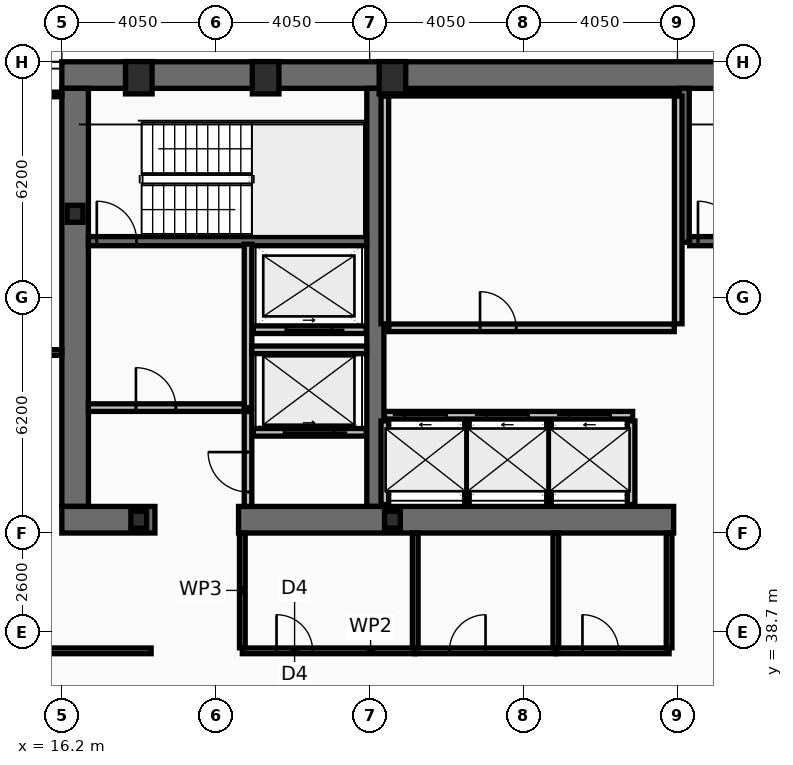
"""IFC4 building model, lengths in metres.
Left out: names, types, materials, properties, quantities, classifications, styles, units other than length and angle.
Written with IfcOpenShell. Run it as: python <this file> out.ifc"""

import sys

from ifc_helpers import new_model, si_unit, direction, frame, frame_2d, origin, origin_2d, place, context, subcontext, project, spatial, rectangle, hollow_rectangle, i_section, extrude, element, fill, save


model = new_model("IFC4")
c1 = context("Model", 3, precision=1e-05, world=origin(), true_north=direction((0.0, 1.0)))
c2 = subcontext(c1, "Body", "Model", "MODEL_VIEW")
j1 = project(units=[si_unit("LENGTHUNIT", "METRE"), si_unit("PLANEANGLEUNIT", "RADIAN")], contexts=[c1])
p1 = place(None, origin())
s1 = spatial("IfcSite", under=j1, at=p1, CompositionType="ELEMENT")
p2 = place(p1, origin())
s2 = spatial("IfcBuilding", under=s1, at=p2, CompositionType="ELEMENT")
p3 = place(p2, frame((0.0, 0.0, 121.8)))
s3 = spatial("IfcBuildingStorey", under=s2, at=p3, CompositionType="ELEMENT", Elevation=121.8)
p4 = place(p3, frame((16.2, 53.35, 0.0), z_axis=(0.0, 0.0, 1.0), x_axis=(1.0, 0.0, 0.0)))
e1 = element("IfcWall", 1, at=p4, inside=s3, PredefinedType="SHEAR", context=c2, shape_type="SweptSolid", body=[
    extrude(rectangle(XDim=40.5, YDim=0.7, at=frame_2d((20.25, 0.0))), origin(), (0.0, 0.0, 1.0), 3.44),
])
p5 = place(p3, frame((16.55, 42.0, 0.0), z_axis=(0.0, 0.0, 1.0), x_axis=(0.0, 1.0, 0.0)))
e2 = element("IfcWall", 2, at=p5, inside=s3, PredefinedType="SHEAR", context=c2, shape_type="SweptSolid", body=[
    extrude(rectangle(XDim=11.0, YDim=0.7, at=frame_2d((5.5, 0.0))), origin(), (0.0, 0.0, 1.0), 3.44),
])
p6 = place(p3, frame((24.45, 42.0, 0.0), z_axis=(0.0, 0.0, 1.0), x_axis=(0.0, 1.0, 0.0)))
e3 = element("IfcWall", 3, at=p6, inside=s3, PredefinedType="SHEAR", context=c2, shape_type="SweptSolid", body=[
    extrude(rectangle(XDim=11.0, YDim=0.45, at=frame_2d((5.5, 0.0))), origin(), (0.0, 0.0, 1.0), 3.44),
])
p7 = place(p3, frame((18.65, 41.65, 0.0), z_axis=(0.0, 0.0, 1.0), x_axis=(-1.0, 0.0, 0.0)))
e4 = element("IfcWall", 4, at=p7, inside=s3, PredefinedType="SHEAR", context=c2, shape_type="SweptSolid", body=[
    extrude(rectangle(XDim=2.45, YDim=0.7, at=frame_2d((1.225, 0.0))), origin(), (0.0, 0.0, 1.0), 3.44),
])
p8 = place(p3, frame((32.3, 41.65, 0.0), z_axis=(0.0, 0.0, 1.0), x_axis=(-1.0, 0.0, 0.0)))
e5 = element("IfcWall", 5, at=p8, inside=s3, PredefinedType="SHEAR", context=c2, shape_type="SweptSolid", body=[
    extrude(rectangle(XDim=11.45, YDim=0.7, at=frame_2d((5.725, 0.0))), origin(), (0.0, 0.0, 1.0), 3.44),
])
p9 = place(p3, frame((32.58, 48.95, 0.0), z_axis=(0.0, 0.0, 1.0), x_axis=(0.0, 1.0, 0.0)))
e6 = element("IfcWall", 6, at=p9, inside=s3, PredefinedType="SHEAR", context=c2, shape_type="SweptSolid", body=[
    extrude(rectangle(XDim=4.05, YDim=0.26, at=frame_2d((2.025, 0.0))), origin(), (0.0, 0.0, 1.0), 3.44),
])
p10 = place(p3, frame((16.9, 48.98, 0.0), z_axis=(0.0, 0.0, 1.0), x_axis=(1.0, 0.0, 0.0)))
e7 = element("IfcWall", 7, at=p10, inside=s3, PredefinedType="SHEAR", context=c2, shape_type="SweptSolid", body=[
    extrude(rectangle(XDim=7.32, YDim=0.24, at=frame_2d((3.66, 0.0))), origin(), (0.0, 0.0, 1.0), 3.44),
])
p11 = place(p10, frame((0.22, 0.0, 0.0)))
e8 = element("IfcOpeningElement", 8, at=p11, cuts=e7, PredefinedType="OPENING", context=c2, shape_type="SweptSolid", body=[
    extrude(rectangle(XDim=1.05, YDim=2.15, at=frame_2d((0.525, 1.075))), frame((0.0, 0.13, 0.0), z_axis=(0.0, -1.0, 0.0), x_axis=(1.0, 0.0, 0.0)), (0.0, 0.0, 1.0), 0.26),
])
p12 = place(p3, frame((32.72, 48.98, 0.0), z_axis=(0.0, 0.0, 1.0), x_axis=(1.0, 0.0, 0.0)))
e9 = element("IfcWall", 9, at=p12, inside=s3, PredefinedType="SHEAR", context=c2, shape_type="SweptSolid", body=[
    extrude(rectangle(XDim=7.56, YDim=0.24, at=frame_2d((3.78, 0.0))), origin(), (0.0, 0.0, 1.0), 3.44),
])
p13 = place(p12, frame((0.22, 0.0, 0.0)))
e10 = element("IfcOpeningElement", 10, at=p13, cuts=e9, PredefinedType="OPENING", context=c2, shape_type="SweptSolid", body=[
    extrude(rectangle(XDim=1.05, YDim=2.15, at=frame_2d((0.525, 1.075))), frame((0.0, 0.13, 0.0), z_axis=(0.0, -1.0, 0.0), x_axis=(1.0, 0.0, 0.0)), (0.0, 0.0, 1.0), 0.26),
])
for number, where, z_axis, x_axis in (
    (11, (18.225, 53.28, 0.0), (0.0, 0.0, 1.0), (1.0, 0.0, 0.0)),
    (12, (21.562, 53.28, 0.0), (0.0, 0.0, 1.0), (1.0, 0.0, 0.0)),
    (13, (24.9, 53.28, 0.0), (0.0, 0.0, 1.0), (1.0, 0.0, 0.0)),
):
    element("IfcColumn", number, at=place(p3, frame(where, z_axis=z_axis, x_axis=x_axis)), inside=s3, PredefinedType="COLUMN", context=c2, shape_type="SweptSolid", body=[
        extrude(hollow_rectangle(XDim=0.7, YDim=0.85, WallThickness=0.05, at=origin_2d()), origin(), (0.0, 0.0, 1.0), 3.6),
    ])
for number, where, z_axis, x_axis in (
    (14, (16.55, 49.7, 0.0), (0.0, 0.0, 1.0), (1.0, 0.0, 0.0)),
    (15, (18.225, 41.65, 0.0), (0.0, 0.0, 1.0), (1.0, 0.0, 0.0)),
    (16, (24.9, 41.65, 0.0), (0.0, 0.0, 1.0), (1.0, 0.0, 0.0)),
):
    element("IfcColumn", number, at=place(p3, frame(where, z_axis=z_axis, x_axis=x_axis)), inside=s3, PredefinedType="COLUMN", context=c2, shape_type="SweptSolid", body=[
        extrude(i_section(OverallWidth=0.416, OverallDepth=0.446, WebThickness=0.039, FlangeThickness=0.063, at=origin_2d()), origin(), (0.0, 0.0, 1.0), 3.6),
    ])
p14 = place(p3, frame((24.69, 44.4, 0.0), z_axis=(0.0, 0.0, 1.0), x_axis=(1.0, 0.0, 0.0)))
e17 = element("IfcWall", 17, at=p14, inside=s3, PredefinedType="PARTITIONING", context=c2, shape_type="SweptSolid", body=[
    extrude(rectangle(XDim=6.53, YDim=0.2, at=frame_2d((3.265, 0.0))), origin(), (0.0, 0.0, 1.0), 3.44),
])
p15 = place(p14, frame((0.53, 0.0, 0.0)))
e18 = element("IfcOpeningElement", 18, at=p15, cuts=e17, PredefinedType="OPENING", context=c2, shape_type="SweptSolid", body=[
    extrude(rectangle(XDim=1.1, YDim=2.18, at=frame_2d((0.55, 1.09))), frame((0.0, 0.11, 0.0), z_axis=(0.0, -1.0, 0.0), x_axis=(1.0, 0.0, 0.0)), (0.0, 0.0, 1.0), 0.22),
])
p16 = place(p14, frame((2.69, 0.0, 0.0)))
e19 = element("IfcOpeningElement", 19, at=p16, cuts=e17, PredefinedType="OPENING", context=c2, shape_type="SweptSolid", body=[
    extrude(rectangle(XDim=1.1, YDim=2.18, at=frame_2d((0.55, 1.09))), frame((0.0, 0.11, 0.0), z_axis=(0.0, -1.0, 0.0), x_axis=(1.0, 0.0, 0.0)), (0.0, 0.0, 1.0), 0.22),
])
p17 = place(p14, frame((4.85, 0.0, 0.0)))
e20 = element("IfcOpeningElement", 20, at=p17, cuts=e17, PredefinedType="OPENING", context=c2, shape_type="SweptSolid", body=[
    extrude(rectangle(XDim=1.1, YDim=2.18, at=frame_2d((0.55, 1.09))), frame((0.0, 0.11, 0.0), z_axis=(0.0, -1.0, 0.0), x_axis=(1.0, 0.0, 0.0)), (0.0, 0.0, 1.0), 0.22),
])
p18 = place(p3, frame((24.21, 43.95, 0.0), z_axis=(0.0, 0.0, 1.0), x_axis=(-1.0, 0.0, 0.0)))
e21 = element("IfcWall", 21, at=p18, inside=s3, PredefinedType="PARTITIONING", context=c2, shape_type="SweptSolid", body=[
    extrude(rectangle(XDim=2.97, YDim=0.2, at=frame_2d((1.485, 0.0))), origin(), (0.0, 0.0, 1.0), 3.44),
])
p19 = place(p18, frame((0.86, 0.0, 0.0)))
e22 = element("IfcOpeningElement", 22, at=p19, cuts=e21, PredefinedType="OPENING", context=c2, shape_type="SweptSolid", body=[
    extrude(rectangle(XDim=1.3, YDim=2.18, at=frame_2d((0.65, 1.09))), frame((0.0, 0.11, 0.0), z_axis=(0.0, -1.0, 0.0), x_axis=(1.0, 0.0, 0.0)), (0.0, 0.0, 1.0), 0.22),
])
p20 = place(p3, frame((24.21, 46.65, 0.0), z_axis=(0.0, 0.0, 1.0), x_axis=(-1.0, 0.0, 0.0)))
e23 = element("IfcWall", 23, at=p20, inside=s3, PredefinedType="PARTITIONING", context=c2, shape_type="SweptSolid", body=[
    extrude(rectangle(XDim=2.97, YDim=0.2, at=frame_2d((1.485, 0.0))), origin(), (0.0, 0.0, 1.0), 3.44),
])
p21 = place(p20, frame((0.91, 0.0, 0.0)))
e24 = element("IfcOpeningElement", 24, at=p21, cuts=e23, PredefinedType="OPENING", context=c2, shape_type="SweptSolid", body=[
    extrude(rectangle(XDim=1.2, YDim=2.18, at=frame_2d((0.6, 1.09))), frame((0.0, 0.11, 0.0), z_axis=(0.0, -1.0, 0.0), x_axis=(1.0, 0.0, 0.0)), (0.0, 0.0, 1.0), 0.22),
])
p22 = place(p3, frame((21.1, 44.6, 0.0), z_axis=(0.0, 0.0, 1.0), x_axis=(0.0, 1.0, 0.0)))
e25 = element("IfcWall", 25, at=p22, inside=s3, PredefinedType="PARTITIONING", context=c2, shape_type="SweptSolid", body=[
    extrude(rectangle(XDim=4.3, YDim=0.2, at=frame_2d((2.15, 0.0))), origin(), (0.0, 0.0, 1.0), 3.44),
])
p23 = place(p3, frame((16.9, 44.6, 0.0), z_axis=(0.0, 0.0, 1.0), x_axis=(1.0, 0.0, 0.0)))
e26 = element("IfcWall", 26, at=p23, inside=s3, PredefinedType="PARTITIONING", context=c2, shape_type="SweptSolid", body=[
    extrude(rectangle(XDim=4.1, YDim=0.2, at=frame_2d((2.05, 0.0))), origin(), (0.0, 0.0, 1.0), 3.44),
])
p24 = place(p23, frame((1.25, 0.0, 0.0)))
e27 = element("IfcOpeningElement", 27, at=p24, cuts=e26, PredefinedType="OPENING", context=c2, shape_type="SweptSolid", body=[
    extrude(rectangle(XDim=1.05, YDim=2.15, at=frame_2d((0.525, 1.075))), frame((0.0, 0.11, 0.0), z_axis=(0.0, -1.0, 0.0), x_axis=(1.0, 0.0, 0.0)), (0.0, 0.0, 1.0), 0.22),
])
p25 = place(p3, frame((21.2, 46.12, 0.0), z_axis=(0.0, 0.0, 1.0), x_axis=(1.0, 0.0, 0.0)))
e28 = element("IfcWall", 28, at=p25, inside=s3, PredefinedType="PARTITIONING", context=c2, shape_type="SweptSolid", body=[
    extrude(rectangle(XDim=3.02, YDim=0.2, at=frame_2d((1.51, 0.0))), origin(), (0.0, 0.0, 1.0), 3.44),
])
p26 = place(p3, frame((21.1, 42.0, 0.0), z_axis=(0.0, 0.0, 1.0), x_axis=(0.0, 1.0, 0.0)))
e29 = element("IfcWall", 29, at=p26, inside=s3, PredefinedType="PARTITIONING", context=c2, shape_type="SweptSolid", body=[
    extrude(rectangle(XDim=2.495, YDim=0.2, at=frame_2d((1.248, 0.0))), origin(), (0.0, 0.0, 1.0), 3.44),
])
p27 = place(p26, frame((0.38, 0.0, 0.0)))
e30 = element("IfcOpeningElement", 30, at=p27, cuts=e29, PredefinedType="OPENING", context=c2, shape_type="SweptSolid", body=[
    extrude(rectangle(XDim=1.05, YDim=2.15, at=frame_2d((0.525, 1.075))), frame((0.0, 0.11, 0.0), z_axis=(0.0, -1.0, 0.0), x_axis=(1.0, 0.0, 0.0)), (0.0, 0.0, 1.0), 0.22),
])
for number, where, z_axis, x_axis in (
    (31, (24.7, 46.805, 0.0), (0.0, 0.0, 1.0), (0.0, 1.0, 0.0)),
    (32, (32.42, 46.805, 0.0), (0.0, 0.0, 1.0), (0.0, 1.0, 0.0)),
):
    element("IfcWall", number, at=place(p3, frame(where, z_axis=z_axis, x_axis=x_axis)), inside=s3, PredefinedType="PARTITIONING", context=c2, shape_type="SweptSolid", body=[
        extrude(rectangle(XDim=5.99, YDim=0.2, at=frame_2d((2.995, 0.0))), origin(), (0.0, 0.0, 1.0), 3.44),
    ])
p28 = place(p3, frame((24.805, 52.86, 0.0), z_axis=(0.0, 0.0, 1.0), x_axis=(1.0, 0.0, 0.0)))
e33 = element("IfcWall", 33, at=p28, inside=s3, PredefinedType="PARTITIONING", context=c2, shape_type="SweptSolid", body=[
    extrude(rectangle(XDim=7.51, YDim=0.12, at=frame_2d((3.755, 0.0))), origin(), (0.0, 0.0, 1.0), 3.44),
])
p29 = place(p3, frame((24.805, 46.7, 0.0), z_axis=(0.0, 0.0, 1.0), x_axis=(1.0, 0.0, 0.0)))
e34 = element("IfcWall", 34, at=p29, inside=s3, PredefinedType="PARTITIONING", context=c2, shape_type="SweptSolid", body=[
    extrude(rectangle(XDim=7.51, YDim=0.2, at=frame_2d((3.755, 0.0))), origin(), (0.0, 0.0, 1.0), 3.44),
])
p30 = place(p29, frame((2.4, 0.0, 0.0)))
e35 = element("IfcOpeningElement", 35, at=p30, cuts=e34, PredefinedType="OPENING", context=c2, shape_type="SweptSolid", body=[
    extrude(rectangle(XDim=0.95, YDim=2.1, at=frame_2d((0.475, 1.05))), frame((0.0, 0.11, 0.0), z_axis=(0.0, -1.0, 0.0), x_axis=(1.0, 0.0, 0.0)), (0.0, 0.0, 1.0), 0.22),
])
for number, where, z_axis, x_axis in (
    (36, (24.7, 42.05, 0.0), (0.0, 0.0, 1.0), (0.0, 1.0, 0.0)),
    (37, (31.18, 42.05, 0.0), (0.0, 0.0, 1.0), (0.0, 1.0, 0.0)),
):
    element("IfcWall", number, at=place(p3, frame(where, z_axis=z_axis, x_axis=x_axis)), inside=s3, PredefinedType="PARTITIONING", context=c2, shape_type="SweptSolid", body=[
        extrude(rectangle(XDim=2.2, YDim=0.2, at=frame_2d((1.1, 0.0))), origin(), (0.0, 0.0, 1.0), 3.44),
    ])
for number, where, z_axis, x_axis in (
    (38, (26.86, 42.05, 0.0), (0.0, 0.0, 1.0), (0.0, 1.0, 0.0)),
    (39, (29.02, 42.05, 0.0), (0.0, 0.0, 1.0), (0.0, 1.0, 0.0)),
):
    element("IfcWall", number, at=place(p3, frame(where, z_axis=z_axis, x_axis=x_axis)), inside=s3, PredefinedType="PARTITIONING", context=c2, shape_type="SweptSolid", body=[
        extrude(rectangle(XDim=2.2, YDim=0.12, at=frame_2d((1.1, 0.0))), origin(), (0.0, 0.0, 1.0), 3.44),
    ])
p31 = place(p3, frame((20.95, 38.2, 0.0), z_axis=(0.0, 0.0, 1.0), x_axis=(1.0, 0.0, 0.0)))
e40 = element("IfcWall", 40, at=p31, inside=s3, PredefinedType="PARTITIONING", context=c2, shape_type="SweptSolid", body=[
    extrude(rectangle(XDim=4.55, YDim=0.15, at=frame_2d((2.275, 0.0))), origin(), (0.0, 0.0, 1.0), 2.73),
])
p32 = place(p31, frame((0.9, 0.0, 0.0)))
e41 = element("IfcOpeningElement", 41, at=p32, cuts=e40, PredefinedType="OPENING", context=c2, shape_type="SweptSolid", body=[
    extrude(rectangle(XDim=0.95, YDim=2.05, at=frame_2d((0.475, 1.025))), frame((0.0, 0.085, 0.0), z_axis=(0.0, -1.0, 0.0), x_axis=(1.0, 0.0, 0.0)), (0.0, 0.0, 1.0), 0.17),
])
p33 = place(p3, frame((25.5, 38.2, 0.0), z_axis=(0.0, 0.0, 1.0), x_axis=(1.0, 0.0, 0.0)))
e42 = element("IfcWall", 42, at=p33, inside=s3, PredefinedType="PARTITIONING", context=c2, shape_type="SweptSolid", body=[
    extrude(rectangle(XDim=3.7, YDim=0.15, at=frame_2d((1.85, 0.0))), origin(), (0.0, 0.0, 1.0), 3.44),
])
p34 = place(p33, frame((0.9, 0.0, 0.0)))
e43 = element("IfcOpeningElement", 43, at=p34, cuts=e42, PredefinedType="OPENING", context=c2, shape_type="SweptSolid", body=[
    extrude(rectangle(XDim=0.95, YDim=2.05, at=frame_2d((0.475, 1.025))), frame((0.0, 0.085, 0.0), z_axis=(0.0, -1.0, 0.0), x_axis=(1.0, 0.0, 0.0)), (0.0, 0.0, 1.0), 0.17),
])
p35 = place(p3, frame((29.2, 38.2, 0.0), z_axis=(0.0, 0.0, 1.0), x_axis=(1.0, 0.0, 0.0)))
e44 = element("IfcWall", 44, at=p35, inside=s3, PredefinedType="PARTITIONING", context=c2, shape_type="SweptSolid", body=[
    extrude(rectangle(XDim=2.98, YDim=0.15, at=frame_2d((1.49, 0.0))), origin(), (0.0, 0.0, 1.0), 2.73),
])
p36 = place(p35, frame((0.7, 0.0, 0.0)))
e45 = element("IfcOpeningElement", 45, at=p36, cuts=e44, PredefinedType="OPENING", context=c2, shape_type="SweptSolid", body=[
    extrude(rectangle(XDim=0.95, YDim=2.05, at=frame_2d((0.475, 1.025))), frame((0.0, 0.085, 0.0), z_axis=(0.0, -1.0, 0.0), x_axis=(1.0, 0.0, 0.0)), (0.0, 0.0, 1.0), 0.17),
])
for number, where, z_axis, x_axis in (
    (46, (20.95, 38.28, 0.0), (0.0, 0.0, 1.0), (0.0, 1.0, 0.0)),
    (47, (25.5, 38.28, 0.0), (0.0, 0.0, 1.0), (0.0, 1.0, 0.0)),
    (48, (29.2, 38.28, 0.0), (0.0, 0.0, 1.0), (0.0, 1.0, 0.0)),
    (49, (32.18, 38.28, 0.0), (0.0, 0.0, 1.0), (0.0, 1.0, 0.0)),
):
    element("IfcWall", number, at=place(p3, frame(where, z_axis=z_axis, x_axis=x_axis)), inside=s3, PredefinedType="PARTITIONING", context=c2, shape_type="SweptSolid", body=[
        extrude(rectangle(XDim=3.02, YDim=0.15, at=frame_2d((1.51, 0.0))), origin(), (0.0, 0.0, 1.0), 3.44),
    ])
p37 = place(p3, frame((4.03, 38.2, 0.0), z_axis=(0.0, 0.0, 1.0), x_axis=(1.0, 0.0, 0.0)))
e50 = element("IfcWall", 50, at=p37, inside=s3, PredefinedType="PARTITIONING", context=c2, shape_type="SweptSolid", body=[
    extrude(rectangle(XDim=14.52, YDim=0.15, at=frame_2d((7.26, 0.0))), origin(), (0.0, 0.0, 1.0), 2.73),
])
p38 = place(p37, frame((10.32, 0.0, 0.0)))
e51 = element("IfcOpeningElement", 51, at=p38, cuts=e50, PredefinedType="OPENING", context=c2, shape_type="SweptSolid", body=[
    extrude(rectangle(XDim=0.95, YDim=2.05, at=frame_2d((0.475, 1.025))), frame((0.0, 0.085, 0.0), z_axis=(0.0, -1.0, 0.0), x_axis=(1.0, 0.0, 0.0)), (0.0, 0.0, 1.0), 0.17),
])
p39 = place(p3, frame((4.095, 46.05, 0.0), z_axis=(0.0, 0.0, 1.0), x_axis=(1.0, 0.0, 0.0)))
e52 = element("IfcWall", 52, at=p39, inside=s3, PredefinedType="PARTITIONING", context=c2, shape_type="SweptSolid", body=[
    extrude(rectangle(XDim=12.105, YDim=0.15, at=frame_2d((6.052, 0.0))), origin(), (0.0, 0.0, 1.0), 2.83),
])
p40 = place(p39, frame((10.32, 0.0, 0.0)))
e53 = element("IfcOpeningElement", 53, at=p40, cuts=e52, PredefinedType="OPENING", context=c2, shape_type="SweptSolid", body=[
    extrude(rectangle(XDim=0.9, YDim=2.05, at=frame_2d((0.45, 1.025))), frame((0.0, 0.085, 0.0), z_axis=(0.0, -1.0, 0.0), x_axis=(1.0, 0.0, 0.0)), (0.0, 0.0, 1.0), 0.17),
])
p41 = place(p3, frame((4.095, 52.84, 0.0), z_axis=(0.0, 0.0, 1.0), x_axis=(1.0, 0.0, 0.0)))
e54 = element("IfcWall", 54, at=p41, inside=s3, PredefinedType="PARTITIONING", context=c2, shape_type="SweptSolid", body=[
    extrude(rectangle(XDim=12.105, YDim=0.12, at=frame_2d((6.052, 0.0))), origin(), (0.0, 0.0, 1.0), 3.44),
])
p42 = place(p11, origin())
e55 = element("IfcDoor", 55, at=p42, inside=s3, OperationType="SINGLE_SWING_LEFT", PredefinedType="DOOR", context=c2, shape_type="SweptSolid", body=[
    extrude(rectangle(XDim=1.05, YDim=2.15, at=frame_2d((0.525, 1.075))), frame((0.0, 0.025, 0.0), z_axis=(0.0, -1.0, 0.0), x_axis=(1.0, 0.0, 0.0)), (0.0, 0.0, 1.0), 0.05),
])
fill(e8, e55)
p43 = place(p13, origin())
e56 = element("IfcDoor", 56, at=p43, inside=s3, OperationType="SINGLE_SWING_LEFT", PredefinedType="DOOR", context=c2, shape_type="SweptSolid", body=[
    extrude(rectangle(XDim=1.05, YDim=2.15, at=frame_2d((0.525, 1.075))), frame((0.0, 0.025, 0.0), z_axis=(0.0, -1.0, 0.0), x_axis=(1.0, 0.0, 0.0)), (0.0, 0.0, 1.0), 0.05),
])
fill(e10, e56)
p44 = place(p15, origin())
e57 = element("IfcDoor", 57, at=p44, inside=s3, OperationType="SLIDING_TO_LEFT", PredefinedType="DOOR", context=c2, shape_type="SweptSolid", body=[
    extrude(rectangle(XDim=1.1, YDim=2.18, at=frame_2d((0.55, 1.09))), frame((0.0, 0.025, 0.0), z_axis=(0.0, -1.0, 0.0), x_axis=(1.0, 0.0, 0.0)), (0.0, 0.0, 1.0), 0.05),
])
fill(e18, e57)
p45 = place(p16, origin())
e58 = element("IfcDoor", 58, at=p45, inside=s3, OperationType="SLIDING_TO_LEFT", PredefinedType="DOOR", context=c2, shape_type="SweptSolid", body=[
    extrude(rectangle(XDim=1.1, YDim=2.18, at=frame_2d((0.55, 1.09))), frame((0.0, 0.025, 0.0), z_axis=(0.0, -1.0, 0.0), x_axis=(1.0, 0.0, 0.0)), (0.0, 0.0, 1.0), 0.05),
])
fill(e19, e58)
p46 = place(p17, origin())
e59 = element("IfcDoor", 59, at=p46, inside=s3, OperationType="SLIDING_TO_LEFT", PredefinedType="DOOR", context=c2, shape_type="SweptSolid", body=[
    extrude(rectangle(XDim=1.1, YDim=2.18, at=frame_2d((0.55, 1.09))), frame((0.0, 0.025, 0.0), z_axis=(0.0, -1.0, 0.0), x_axis=(1.0, 0.0, 0.0)), (0.0, 0.0, 1.0), 0.05),
])
fill(e20, e59)
p47 = place(p19, origin())
e60 = element("IfcDoor", 60, at=p47, inside=s3, OperationType="SLIDING_TO_LEFT", PredefinedType="DOOR", context=c2, shape_type="SweptSolid", body=[
    extrude(rectangle(XDim=1.3, YDim=2.18, at=frame_2d((0.65, 1.09))), frame((0.0, 0.025, 0.0), z_axis=(0.0, -1.0, 0.0), x_axis=(1.0, 0.0, 0.0)), (0.0, 0.0, 1.0), 0.05),
])
fill(e22, e60)
p48 = place(p21, origin())
e61 = element("IfcDoor", 61, at=p48, inside=s3, OperationType="SLIDING_TO_LEFT", PredefinedType="DOOR", context=c2, shape_type="SweptSolid", body=[
    extrude(rectangle(XDim=1.2, YDim=2.18, at=frame_2d((0.6, 1.09))), frame((0.0, 0.025, 0.0), z_axis=(0.0, -1.0, 0.0), x_axis=(1.0, 0.0, 0.0)), (0.0, 0.0, 1.0), 0.05),
])
fill(e24, e61)
p49 = place(p24, origin())
e62 = element("IfcDoor", 62, at=p49, inside=s3, OperationType="SINGLE_SWING_LEFT", PredefinedType="DOOR", context=c2, shape_type="SweptSolid", body=[
    extrude(rectangle(XDim=1.05, YDim=2.15, at=frame_2d((0.525, 1.075))), frame((0.0, 0.025, 0.0), z_axis=(0.0, -1.0, 0.0), x_axis=(1.0, 0.0, 0.0)), (0.0, 0.0, 1.0), 0.05),
])
fill(e27, e62)
p50 = place(p27, origin())
e63 = element("IfcDoor", 63, at=p50, inside=s3, OperationType="SINGLE_SWING_RIGHT", PredefinedType="DOOR", context=c2, shape_type="SweptSolid", body=[
    extrude(rectangle(XDim=1.05, YDim=2.15, at=frame_2d((0.525, 1.075))), frame((0.0, 0.025, 0.0), z_axis=(0.0, -1.0, 0.0), x_axis=(1.0, 0.0, 0.0)), (0.0, 0.0, 1.0), 0.05),
])
fill(e30, e63)
p51 = place(p30, origin())
e64 = element("IfcDoor", 64, at=p51, inside=s3, OperationType="SINGLE_SWING_LEFT", PredefinedType="DOOR", context=c2, shape_type="SweptSolid", body=[
    extrude(rectangle(XDim=0.95, YDim=2.1, at=frame_2d((0.475, 1.05))), frame((0.0, 0.025, 0.0), z_axis=(0.0, -1.0, 0.0), x_axis=(1.0, 0.0, 0.0)), (0.0, 0.0, 1.0), 0.05),
])
fill(e35, e64)
p52 = place(p32, origin())
e65 = element("IfcDoor", 65, at=p52, inside=s3, OperationType="SINGLE_SWING_LEFT", PredefinedType="DOOR", context=c2, shape_type="SweptSolid", body=[
    extrude(rectangle(XDim=0.95, YDim=2.05, at=frame_2d((0.475, 1.025))), frame((0.0, 0.025, 0.0), z_axis=(0.0, -1.0, 0.0), x_axis=(1.0, 0.0, 0.0)), (0.0, 0.0, 1.0), 0.05),
])
fill(e41, e65)
p53 = place(p34, origin())
e66 = element("IfcDoor", 66, at=p53, inside=s3, OperationType="SINGLE_SWING_RIGHT", PredefinedType="DOOR", context=c2, shape_type="SweptSolid", body=[
    extrude(rectangle(XDim=0.95, YDim=2.05, at=frame_2d((0.475, 1.025))), frame((0.0, 0.025, 0.0), z_axis=(0.0, -1.0, 0.0), x_axis=(1.0, 0.0, 0.0)), (0.0, 0.0, 1.0), 0.05),
])
fill(e43, e66)
p54 = place(p36, origin())
e67 = element("IfcDoor", 67, at=p54, inside=s3, OperationType="SINGLE_SWING_LEFT", PredefinedType="DOOR", context=c2, shape_type="SweptSolid", body=[
    extrude(rectangle(XDim=0.95, YDim=2.05, at=frame_2d((0.475, 1.025))), frame((0.0, 0.025, 0.0), z_axis=(0.0, -1.0, 0.0), x_axis=(1.0, 0.0, 0.0)), (0.0, 0.0, 1.0), 0.05),
])
fill(e45, e67)
save(model, sys.argv[1])
